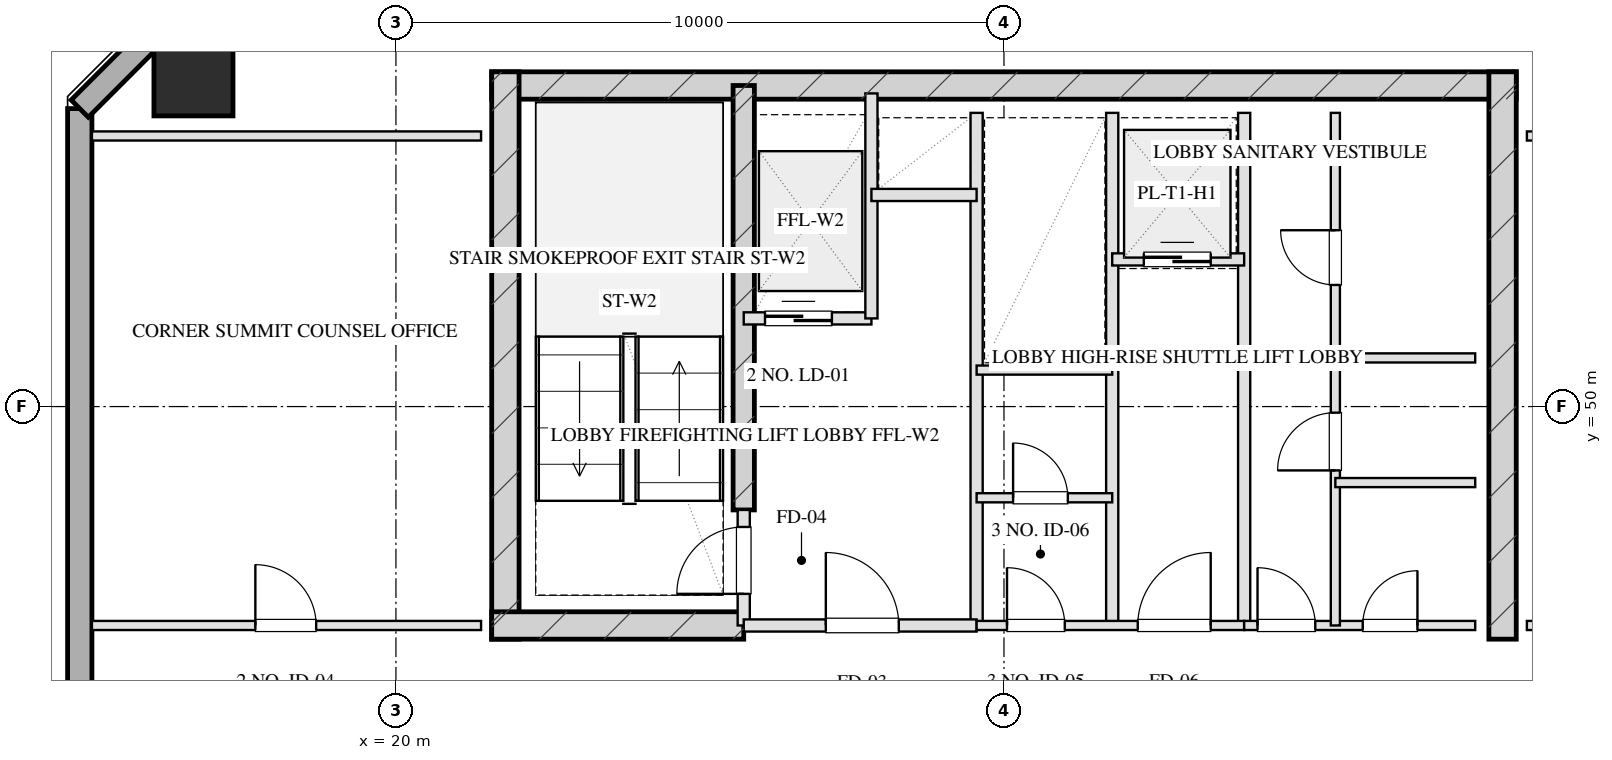
"""IFC4 building model, lengths in metres.
Left out: names, types, materials, properties, quantities, classifications, styles, units other than length and angle.
Written with IfcOpenShell. Run it as: python <this file> out.ifc"""

import sys

from ifc_helpers import new_model, si_unit, direction, frame, frame_2d, origin, origin_2d, place, context, subcontext, project, spatial, rectangle, hollow_rectangle, extrude, element, fill, save


model = new_model("IFC4")
c1 = context("Model", 3, precision=1e-05, world=origin(), true_north=direction((0.0, 1.0)))
c2 = subcontext(c1, "Body", "Model", "MODEL_VIEW")
j1 = project(units=[si_unit("LENGTHUNIT", "METRE"), si_unit("PLANEANGLEUNIT", "RADIAN")], contexts=[c1])
p1 = place(None, origin())
s1 = spatial("IfcSite", under=j1, at=p1, CompositionType="ELEMENT")
p2 = place(p1, origin())
s2 = spatial("IfcBuilding", under=s1, at=p2, CompositionType="ELEMENT")
p3 = place(p2, frame((0.0, 0.0, 263.2)))
s3 = spatial("IfcBuildingStorey", under=s2, at=p3, CompositionType="ELEMENT", Elevation=263.2)
p4 = place(p3, frame((21.575, 55.28, 0.0), z_axis=(0.0, 0.0, 1.0), x_axis=(1.0, 0.0, 0.0)))
e1 = element("IfcWall", 1, at=p4, inside=s3, PredefinedType="SHEAR", context=c2, shape_type="SweptSolid", body=[
    extrude(rectangle(XDim=16.85, YDim=0.45, at=frame_2d((8.425, 0.0))), origin(), (0.0, 0.0, 1.0), 3.2),
])
for number, where, z_axis, x_axis in (
    (2, (21.8, 46.175, 0.0), (0.0, 0.0, 1.0), (0.0, 1.0, 0.0)),
    (3, (38.2, 46.175, 0.0), (0.0, 0.0, 1.0), (0.0, 1.0, 0.0)),
):
    element("IfcWall", number, at=place(p3, frame(where, z_axis=z_axis, x_axis=x_axis)), inside=s3, PredefinedType="SHEAR", context=c2, shape_type="SweptSolid", body=[
        extrude(rectangle(XDim=9.33, YDim=0.45, at=frame_2d((4.665, 0.0))), origin(), (0.0, 0.0, 1.0), 3.2),
    ])
p5 = place(p3, frame((25.72, 48.3, 0.0), z_axis=(0.0, 0.0, 1.0), x_axis=(0.0, 1.0, 0.0)))
e4 = element("IfcWall", 4, at=p5, inside=s3, PredefinedType="SHEAR", context=c2, shape_type="SweptSolid", body=[
    extrude(rectangle(XDim=6.98, YDim=0.35, at=frame_2d((3.49, 0.0))), origin(), (0.0, 0.0, 1.0), 3.2),
])
p6 = place(p3, frame((21.575, 46.4, 0.0), z_axis=(0.0, 0.0, 1.0), x_axis=(1.0, 0.0, 0.0)))
e5 = element("IfcWall", 5, at=p6, inside=s3, PredefinedType="SHEAR", context=c2, shape_type="SweptSolid", body=[
    extrude(rectangle(XDim=4.145, YDim=0.45, at=frame_2d((2.073, 0.0))), origin(), (0.0, 0.0, 1.0), 3.2),
])
p7 = place(p3, frame((16.67, 55.43, 0.0), z_axis=(0.0, 0.0, 1.0), x_axis=(1.0, 0.0, 0.0)))
e6 = element("IfcColumn", 6, at=p7, inside=s3, PredefinedType="COLUMN", context=c2, shape_type="SweptSolid", body=[
    extrude(hollow_rectangle(XDim=1.3, YDim=1.3, WallThickness=0.045, at=origin_2d()), origin(), (0.0, 0.0, 1.0), 3.201),
])
p8 = place(p3, frame((14.8, 13.1, 0.0), z_axis=(0.0, 0.0, 1.0), x_axis=(0.0, 1.0, 0.0)))
e7 = element("IfcWall", 7, at=p8, inside=s3, PredefinedType="SOLIDWALL", context=c2, shape_type="SweptSolid", body=[
    extrude(rectangle(XDim=41.8, YDim=0.4, at=frame_2d((20.9, 0.0))), origin(), (0.0, 0.0, 1.0), 2.36),
])
p9 = place(p8, frame((13.525, 0.0, 0.75)))
e8 = element("IfcOpeningElement", 8, at=p9, cuts=e7, PredefinedType="OPENING", context=c2, shape_type="SweptSolid", body=[
    extrude(rectangle(XDim=1.95, YDim=1.21, at=frame_2d((0.975, 0.605))), frame((0.0, 0.21, 0.0), z_axis=(0.0, -1.0, 0.0), x_axis=(1.0, 0.0, 0.0)), (0.0, 0.0, 1.0), 0.42),
])
p10 = place(p8, frame((17.325, 0.0, 0.75)))
e9 = element("IfcOpeningElement", 9, at=p10, cuts=e7, PredefinedType="OPENING", context=c2, shape_type="SweptSolid", body=[
    extrude(rectangle(XDim=1.95, YDim=1.21, at=frame_2d((0.975, 0.605))), frame((0.0, 0.21, 0.0), z_axis=(0.0, -1.0, 0.0), x_axis=(1.0, 0.0, 0.0)), (0.0, 0.0, 1.0), 0.42),
])
p11 = place(p8, frame((22.525, 0.0, 0.75)))
e10 = element("IfcOpeningElement", 10, at=p11, cuts=e7, PredefinedType="OPENING", context=c2, shape_type="SweptSolid", body=[
    extrude(rectangle(XDim=1.95, YDim=1.21, at=frame_2d((0.975, 0.605))), frame((0.0, 0.21, 0.0), z_axis=(0.0, -1.0, 0.0), x_axis=(1.0, 0.0, 0.0)), (0.0, 0.0, 1.0), 0.42),
])
p12 = place(p8, frame((26.325, 0.0, 0.75)))
e11 = element("IfcOpeningElement", 11, at=p12, cuts=e7, PredefinedType="OPENING", context=c2, shape_type="SweptSolid", body=[
    extrude(rectangle(XDim=1.95, YDim=1.21, at=frame_2d((0.975, 0.605))), frame((0.0, 0.21, 0.0), z_axis=(0.0, -1.0, 0.0), x_axis=(1.0, 0.0, 0.0)), (0.0, 0.0, 1.0), 0.42),
])
p13 = place(p3, frame((14.8, 54.9, 0.0), z_axis=(0.0, 0.0, 1.0), x_axis=(0.707070815327, 0.707142745217, 0.0)))
e12 = element("IfcWall", 12, at=p13, inside=s3, PredefinedType="SOLIDWALL", context=c2, shape_type="SweptSolid", body=[
    extrude(rectangle(XDim=3.394, YDim=0.4, at=frame_2d((1.697, 0.0))), origin(), (0.0, 0.0, 1.0), 2.36),
])
p14 = place(p3, frame((25.72, 46.4, 0.0), z_axis=(0.0, 0.0, 1.0), x_axis=(0.0, 1.0, 0.0)))
e13 = element("IfcWall", 13, at=p14, inside=s3, PredefinedType="PARTITIONING", context=c2, shape_type="SweptSolid", body=[
    extrude(rectangle(XDim=1.9, YDim=0.2, at=frame_2d((0.95, 0.0))), origin(), (0.0, 0.0, 1.0), 2.925),
])
p15 = place(p14, frame((0.52, 0.0, 0.0)))
e14 = element("IfcOpeningElement", 14, at=p15, cuts=e13, PredefinedType="OPENING", context=c2, shape_type="SweptSolid", body=[
    extrude(rectangle(XDim=1.1, YDim=2.05, at=frame_2d((0.55, 1.025))), frame((0.0, 0.11, 0.0), z_axis=(0.0, -1.0, 0.0), x_axis=(1.0, 0.0, 0.0)), (0.0, 0.0, 1.0), 0.22),
])
p16 = place(p3, frame((29.55, 46.4, 0.0), z_axis=(0.0, 0.0, 1.0), x_axis=(0.0, 1.0, 0.0)))
e15 = element("IfcWall", 15, at=p16, inside=s3, PredefinedType="PARTITIONING", context=c2, shape_type="SweptSolid", body=[
    extrude(rectangle(XDim=8.43, YDim=0.2, at=frame_2d((4.215, 0.0))), origin(), (0.0, 0.0, 1.0), 2.925),
])
p17 = place(p3, frame((25.72, 46.4, 0.0), z_axis=(0.0, 0.0, 1.0), x_axis=(1.0, 0.0, 0.0)))
e16 = element("IfcWall", 16, at=p17, inside=s3, PredefinedType="PARTITIONING", context=c2, shape_type="SweptSolid", body=[
    extrude(rectangle(XDim=3.83, YDim=0.2, at=frame_2d((1.915, 0.0))), origin(), (0.0, 0.0, 1.0), 2.925),
])
p18 = place(p17, frame((1.35, 0.0, 0.0)))
e17 = element("IfcOpeningElement", 17, at=p18, cuts=e16, PredefinedType="OPENING", context=c2, shape_type="SweptSolid", body=[
    extrude(rectangle(XDim=1.2, YDim=2.05, at=frame_2d((0.6, 1.025))), frame((0.0, 0.11, 0.0), z_axis=(0.0, -1.0, 0.0), x_axis=(1.0, 0.0, 0.0)), (0.0, 0.0, 1.0), 0.22),
])
p19 = place(p3, frame((25.72, 51.45, 0.0), z_axis=(0.0, 0.0, 1.0), x_axis=(1.0, 0.0, 0.0)))
e18 = element("IfcWall", 18, at=p19, inside=s3, PredefinedType="PARTITIONING", context=c2, shape_type="SweptSolid", body=[
    extrude(rectangle(XDim=2.1, YDim=0.2, at=frame_2d((1.05, 0.0))), origin(), (0.0, 0.0, 1.0), 2.925),
])
p20 = place(p19, frame((0.35, 0.0, 0.0)))
e19 = element("IfcOpeningElement", 19, at=p20, cuts=e18, PredefinedType="OPENING", context=c2, shape_type="SweptSolid", body=[
    extrude(rectangle(XDim=1.1, YDim=2.05, at=frame_2d((0.55, 1.025))), frame((0.0, 0.11, 0.0), z_axis=(0.0, -1.0, 0.0), x_axis=(1.0, 0.0, 0.0)), (0.0, 0.0, 1.0), 0.22),
])
p21 = place(p3, frame((27.82, 51.45, 0.0), z_axis=(0.0, 0.0, 1.0), x_axis=(0.0, 1.0, 0.0)))
e20 = element("IfcWall", 20, at=p21, inside=s3, PredefinedType="PARTITIONING", context=c2, shape_type="SweptSolid", body=[
    extrude(rectangle(XDim=3.7, YDim=0.2, at=frame_2d((1.85, 0.0))), origin(), (0.0, 0.0, 1.0), 2.925),
])
p22 = place(p3, frame((27.82, 53.48, 0.0), z_axis=(0.0, 0.0, 1.0), x_axis=(1.0, 0.0, 0.0)))
e21 = element("IfcWall", 21, at=p22, inside=s3, PredefinedType="PARTITIONING", context=c2, shape_type="SweptSolid", body=[
    extrude(rectangle(XDim=1.73, YDim=0.2, at=frame_2d((0.865, 0.0))), origin(), (0.0, 0.0, 1.0), 2.925),
])
for number, where, z_axis, x_axis in (
    (22, (33.95, 46.4, 0.0), (0.0, 0.0, 1.0), (0.0, 1.0, 0.0)),
    (23, (31.78, 46.4, 0.0), (0.0, 0.0, 1.0), (0.0, 1.0, 0.0)),
):
    element("IfcWall", number, at=place(p3, frame(where, z_axis=z_axis, x_axis=x_axis)), inside=s3, PredefinedType="PARTITIONING", context=c2, shape_type="SweptSolid", body=[
        extrude(rectangle(XDim=8.43, YDim=0.2, at=frame_2d((4.215, 0.0))), origin(), (0.0, 0.0, 1.0), 2.925),
    ])
p23 = place(p3, frame((29.55, 46.4, 0.0), z_axis=(0.0, 0.0, 1.0), x_axis=(1.0, 0.0, 0.0)))
e24 = element("IfcWall", 24, at=p23, inside=s3, PredefinedType="PARTITIONING", context=c2, shape_type="SweptSolid", body=[
    extrude(rectangle(XDim=4.4, YDim=0.15, at=frame_2d((2.2, 0.0))), origin(), (0.0, 0.0, 1.0), 2.925),
])
p24 = place(p23, frame((0.5, 0.0, 0.0)))
e25 = element("IfcOpeningElement", 25, at=p24, cuts=e24, PredefinedType="OPENING", context=c2, shape_type="SweptSolid", body=[
    extrude(rectangle(XDim=0.95, YDim=2.05, at=frame_2d((0.475, 1.025))), frame((0.0, 0.085, 0.0), z_axis=(0.0, -1.0, 0.0), x_axis=(1.0, 0.0, 0.0)), (0.0, 0.0, 1.0), 0.17),
])
p25 = place(p23, frame((2.65, 0.0, 0.0)))
e26 = element("IfcOpeningElement", 26, at=p25, cuts=e24, PredefinedType="OPENING", context=c2, shape_type="SweptSolid", body=[
    extrude(rectangle(XDim=1.2, YDim=2.05, at=frame_2d((0.6, 1.025))), frame((0.0, 0.085, 0.0), z_axis=(0.0, -1.0, 0.0), x_axis=(1.0, 0.0, 0.0)), (0.0, 0.0, 1.0), 0.17),
])
p26 = place(p3, frame((29.55, 50.6, 0.0), z_axis=(0.0, 0.0, 1.0), x_axis=(1.0, 0.0, 0.0)))
e27 = element("IfcWall", 27, at=p26, inside=s3, PredefinedType="PARTITIONING", context=c2, shape_type="SweptSolid", body=[
    extrude(rectangle(XDim=2.23, YDim=0.15, at=frame_2d((1.115, 0.0))), origin(), (0.0, 0.0, 1.0), 2.925),
])
p27 = place(p3, frame((29.55, 48.5, 0.0), z_axis=(0.0, 0.0, 1.0), x_axis=(1.0, 0.0, 0.0)))
e28 = element("IfcWall", 28, at=p27, inside=s3, PredefinedType="PARTITIONING", context=c2, shape_type="SweptSolid", body=[
    extrude(rectangle(XDim=2.23, YDim=0.15, at=frame_2d((1.115, 0.0))), origin(), (0.0, 0.0, 1.0), 2.925),
])
p28 = place(p27, frame((0.6, 0.0, 0.0)))
e29 = element("IfcOpeningElement", 29, at=p28, cuts=e28, PredefinedType="OPENING", context=c2, shape_type="SweptSolid", body=[
    extrude(rectangle(XDim=0.9, YDim=2.05, at=frame_2d((0.45, 1.025))), frame((0.0, 0.085, 0.0), z_axis=(0.0, -1.0, 0.0), x_axis=(1.0, 0.0, 0.0)), (0.0, 0.0, 1.0), 0.17),
])
p29 = place(p3, frame((31.78, 52.42, 0.0), z_axis=(0.0, 0.0, 1.0), x_axis=(1.0, 0.0, 0.0)))
e30 = element("IfcWall", 30, at=p29, inside=s3, PredefinedType="PARTITIONING", context=c2, shape_type="SweptSolid", body=[
    extrude(rectangle(XDim=2.17, YDim=0.2, at=frame_2d((1.085, 0.0))), origin(), (0.0, 0.0, 1.0), 2.925),
])
p30 = place(p29, frame((0.52, 0.0, 0.0)))
e31 = element("IfcOpeningElement", 31, at=p30, cuts=e30, PredefinedType="OPENING", context=c2, shape_type="SweptSolid", body=[
    extrude(rectangle(XDim=1.1, YDim=2.05, at=frame_2d((0.55, 1.025))), frame((0.0, 0.11, 0.0), z_axis=(0.0, -1.0, 0.0), x_axis=(1.0, 0.0, 0.0)), (0.0, 0.0, 1.0), 0.22),
])
p31 = place(p3, frame((33.95, 46.4, 0.0), z_axis=(0.0, 0.0, 1.0), x_axis=(1.0, 0.0, 0.0)))
e32 = element("IfcWall", 32, at=p31, inside=s3, PredefinedType="PARTITIONING", context=c2, shape_type="SweptSolid", body=[
    extrude(rectangle(XDim=3.8, YDim=0.15, at=frame_2d((1.9, 0.0))), origin(), (0.0, 0.0, 1.0), 2.925),
])
p32 = place(p31, frame((0.22, 0.0, 0.0)))
e33 = element("IfcOpeningElement", 33, at=p32, cuts=e32, PredefinedType="OPENING", context=c2, shape_type="SweptSolid", body=[
    extrude(rectangle(XDim=0.95, YDim=2.05, at=frame_2d((0.475, 1.025))), frame((0.0, 0.085, 0.0), z_axis=(0.0, -1.0, 0.0), x_axis=(1.0, 0.0, 0.0)), (0.0, 0.0, 1.0), 0.17),
])
p33 = place(p31, frame((1.95, 0.0, 0.0)))
e34 = element("IfcOpeningElement", 34, at=p33, cuts=e32, PredefinedType="OPENING", context=c2, shape_type="SweptSolid", body=[
    extrude(rectangle(XDim=0.9, YDim=2.05, at=frame_2d((0.45, 1.025))), frame((0.0, 0.085, 0.0), z_axis=(0.0, -1.0, 0.0), x_axis=(1.0, 0.0, 0.0)), (0.0, 0.0, 1.0), 0.17),
])
p34 = place(p3, frame((35.45, 46.4, 0.0), z_axis=(0.0, 0.0, 1.0), x_axis=(0.0, 1.0, 0.0)))
e35 = element("IfcWall", 35, at=p34, inside=s3, PredefinedType="PARTITIONING", context=c2, shape_type="SweptSolid", body=[
    extrude(rectangle(XDim=8.43, YDim=0.15, at=frame_2d((4.215, 0.0))), origin(), (0.0, 0.0, 1.0), 2.515),
])
p35 = place(p34, frame((2.55, 0.0, 0.0)))
e36 = element("IfcOpeningElement", 36, at=p35, cuts=e35, PredefinedType="OPENING", context=c2, shape_type="SweptSolid", body=[
    extrude(rectangle(XDim=0.95, YDim=2.05, at=frame_2d((0.475, 1.025))), frame((0.0, 0.085, 0.0), z_axis=(0.0, -1.0, 0.0), x_axis=(1.0, 0.0, 0.0)), (0.0, 0.0, 1.0), 0.17),
])
p36 = place(p34, frame((5.6, 0.0, 0.0)))
e37 = element("IfcOpeningElement", 37, at=p36, cuts=e35, PredefinedType="OPENING", context=c2, shape_type="SweptSolid", body=[
    extrude(rectangle(XDim=0.9, YDim=2.05, at=frame_2d((0.45, 1.025))), frame((0.0, 0.085, 0.0), z_axis=(0.0, -1.0, 0.0), x_axis=(1.0, 0.0, 0.0)), (0.0, 0.0, 1.0), 0.17),
])
for number, where, z_axis, x_axis in (
    (38, (35.45, 50.8, 0.0), (0.0, 0.0, 1.0), (1.0, 0.0, 0.0)),
    (39, (35.45, 48.75, 0.0), (0.0, 0.0, 1.0), (1.0, 0.0, 0.0)),
):
    element("IfcWall", number, at=place(p3, frame(where, z_axis=z_axis, x_axis=x_axis)), inside=s3, PredefinedType="PARTITIONING", context=c2, shape_type="SweptSolid", body=[
        extrude(rectangle(XDim=2.3, YDim=0.15, at=frame_2d((1.15, 0.0))), origin(), (0.0, 0.0, 1.0), 2.925),
    ])
p37 = place(p3, frame((15.0, 54.45, 0.0), z_axis=(0.0, 0.0, 1.0), x_axis=(1.0, 0.0, 0.0)))
e40 = element("IfcWall", 40, at=p37, inside=s3, PredefinedType="PARTITIONING", context=c2, shape_type="SweptSolid", body=[
    extrude(rectangle(XDim=6.4, YDim=0.15, at=frame_2d((3.2, 0.0))), origin(), (0.0, 0.0, 1.0), 2.925),
])
p38 = place(p3, frame((15.0, 46.4, 0.0), z_axis=(0.0, 0.0, 1.0), x_axis=(1.0, 0.0, 0.0)))
e41 = element("IfcWall", 41, at=p38, inside=s3, PredefinedType="PARTITIONING", context=c2, shape_type="SweptSolid", body=[
    extrude(rectangle(XDim=6.4, YDim=0.15, at=frame_2d((3.2, 0.0))), origin(), (0.0, 0.0, 1.0), 2.925),
])
p39 = place(p38, frame((2.688, 0.0, 0.0)))
e42 = element("IfcOpeningElement", 42, at=p39, cuts=e41, PredefinedType="OPENING", context=c2, shape_type="SweptSolid", body=[
    extrude(rectangle(XDim=1.0, YDim=2.05, at=frame_2d((0.5, 1.025))), frame((0.0, 0.085, 0.0), z_axis=(0.0, -1.0, 0.0), x_axis=(1.0, 0.0, 0.0)), (0.0, 0.0, 1.0), 0.17),
])
p40 = place(p3, frame((38.6, 54.45, 0.0), z_axis=(0.0, 0.0, 1.0), x_axis=(1.0, 0.0, 0.0)))
e43 = element("IfcWall", 43, at=p40, inside=s3, PredefinedType="PARTITIONING", context=c2, shape_type="SweptSolid", body=[
    extrude(rectangle(XDim=6.4, YDim=0.15, at=frame_2d((3.2, 0.0))), origin(), (0.0, 0.0, 1.0), 2.925),
])
p41 = place(p3, frame((38.6, 46.4, 0.0), z_axis=(0.0, 0.0, 1.0), x_axis=(1.0, 0.0, 0.0)))
e44 = element("IfcWall", 44, at=p41, inside=s3, PredefinedType="PARTITIONING", context=c2, shape_type="SweptSolid", body=[
    extrude(rectangle(XDim=6.4, YDim=0.15, at=frame_2d((3.2, 0.0))), origin(), (0.0, 0.0, 1.0), 2.925),
])
p42 = place(p41, frame((2.688, 0.0, 0.0)))
e45 = element("IfcOpeningElement", 45, at=p42, cuts=e44, PredefinedType="OPENING", context=c2, shape_type="SweptSolid", body=[
    extrude(rectangle(XDim=1.0, YDim=2.05, at=frame_2d((0.5, 1.025))), frame((0.0, 0.085, 0.0), z_axis=(0.0, -1.0, 0.0), x_axis=(1.0, 0.0, 0.0)), (0.0, 0.0, 1.0), 0.17),
])
p43 = place(p15, origin())
e46 = element("IfcDoor", 46, at=p43, inside=s3, OperationType="SINGLE_SWING_LEFT", PredefinedType="DOOR", context=c2, shape_type="SweptSolid", body=[
    extrude(rectangle(XDim=1.1, YDim=2.05, at=frame_2d((0.55, 1.025))), frame((0.0, 0.025, 0.0), z_axis=(0.0, -1.0, 0.0), x_axis=(1.0, 0.0, 0.0)), (0.0, 0.0, 1.0), 0.05),
])
fill(e14, e46)
p44 = place(p18, origin())
e47 = element("IfcDoor", 47, at=p44, inside=s3, OperationType="SINGLE_SWING_LEFT", PredefinedType="DOOR", context=c2, shape_type="SweptSolid", body=[
    extrude(rectangle(XDim=1.2, YDim=2.05, at=frame_2d((0.6, 1.025))), frame((0.0, 0.025, 0.0), z_axis=(0.0, -1.0, 0.0), x_axis=(1.0, 0.0, 0.0)), (0.0, 0.0, 1.0), 0.05),
])
fill(e17, e47)
p45 = place(p20, origin())
e48 = element("IfcDoor", 48, at=p45, inside=s3, OperationType="DOUBLE_DOOR_SLIDING", PredefinedType="DOOR", context=c2, shape_type="SweptSolid", body=[
    extrude(rectangle(XDim=1.1, YDim=2.05, at=frame_2d((0.55, 1.025))), frame((0.0, 0.025, 0.0), z_axis=(0.0, -1.0, 0.0), x_axis=(1.0, 0.0, 0.0)), (0.0, 0.0, 1.0), 0.05),
])
fill(e19, e48)
p46 = place(p24, origin())
e49 = element("IfcDoor", 49, at=p46, inside=s3, OperationType="SINGLE_SWING_LEFT", PredefinedType="DOOR", context=c2, shape_type="SweptSolid", body=[
    extrude(rectangle(XDim=0.95, YDim=2.05, at=frame_2d((0.475, 1.025))), frame((0.0, 0.025, 0.0), z_axis=(0.0, -1.0, 0.0), x_axis=(1.0, 0.0, 0.0)), (0.0, 0.0, 1.0), 0.05),
])
fill(e25, e49)
p47 = place(p25, origin())
e50 = element("IfcDoor", 50, at=p47, inside=s3, OperationType="SINGLE_SWING_RIGHT", PredefinedType="DOOR", context=c2, shape_type="SweptSolid", body=[
    extrude(rectangle(XDim=1.2, YDim=2.05, at=frame_2d((0.6, 1.025))), frame((0.0, 0.025, 0.0), z_axis=(0.0, -1.0, 0.0), x_axis=(1.0, 0.0, 0.0)), (0.0, 0.0, 1.0), 0.05),
])
fill(e26, e50)
p48 = place(p28, origin())
e51 = element("IfcDoor", 51, at=p48, inside=s3, OperationType="SINGLE_SWING_LEFT", PredefinedType="DOOR", context=c2, shape_type="SweptSolid", body=[
    extrude(rectangle(XDim=0.9, YDim=2.05, at=frame_2d((0.45, 1.025))), frame((0.0, 0.025, 0.0), z_axis=(0.0, -1.0, 0.0), x_axis=(1.0, 0.0, 0.0)), (0.0, 0.0, 1.0), 0.05),
])
fill(e29, e51)
p49 = place(p30, origin())
e52 = element("IfcDoor", 52, at=p49, inside=s3, OperationType="DOUBLE_DOOR_SLIDING", PredefinedType="DOOR", context=c2, shape_type="SweptSolid", body=[
    extrude(rectangle(XDim=1.1, YDim=2.05, at=frame_2d((0.55, 1.025))), frame((0.0, 0.025, 0.0), z_axis=(0.0, -1.0, 0.0), x_axis=(1.0, 0.0, 0.0)), (0.0, 0.0, 1.0), 0.05),
])
fill(e31, e52)
p50 = place(p32, origin())
e53 = element("IfcDoor", 53, at=p50, inside=s3, OperationType="SINGLE_SWING_LEFT", PredefinedType="DOOR", context=c2, shape_type="SweptSolid", body=[
    extrude(rectangle(XDim=0.95, YDim=2.05, at=frame_2d((0.475, 1.025))), frame((0.0, 0.025, 0.0), z_axis=(0.0, -1.0, 0.0), x_axis=(1.0, 0.0, 0.0)), (0.0, 0.0, 1.0), 0.05),
])
fill(e33, e53)
p51 = place(p33, origin())
e54 = element("IfcDoor", 54, at=p51, inside=s3, OperationType="SINGLE_SWING_RIGHT", PredefinedType="DOOR", context=c2, shape_type="SweptSolid", body=[
    extrude(rectangle(XDim=0.9, YDim=2.05, at=frame_2d((0.45, 1.025))), frame((0.0, 0.025, 0.0), z_axis=(0.0, -1.0, 0.0), x_axis=(1.0, 0.0, 0.0)), (0.0, 0.0, 1.0), 0.05),
])
fill(e34, e54)
p52 = place(p35, origin())
e55 = element("IfcDoor", 55, at=p52, inside=s3, OperationType="SINGLE_SWING_LEFT", PredefinedType="DOOR", context=c2, shape_type="SweptSolid", body=[
    extrude(rectangle(XDim=0.95, YDim=2.05, at=frame_2d((0.475, 1.025))), frame((0.0, 0.025, 0.0), z_axis=(0.0, -1.0, 0.0), x_axis=(1.0, 0.0, 0.0)), (0.0, 0.0, 1.0), 0.05),
])
fill(e36, e55)
p53 = place(p36, origin())
e56 = element("IfcDoor", 56, at=p53, inside=s3, OperationType="SINGLE_SWING_RIGHT", PredefinedType="DOOR", context=c2, shape_type="SweptSolid", body=[
    extrude(rectangle(XDim=0.9, YDim=2.05, at=frame_2d((0.45, 1.025))), frame((0.0, 0.025, 0.0), z_axis=(0.0, -1.0, 0.0), x_axis=(1.0, 0.0, 0.0)), (0.0, 0.0, 1.0), 0.05),
])
fill(e37, e56)
p54 = place(p39, origin())
e57 = element("IfcDoor", 57, at=p54, inside=s3, OperationType="SINGLE_SWING_LEFT", PredefinedType="DOOR", context=c2, shape_type="SweptSolid", body=[
    extrude(rectangle(XDim=1.0, YDim=2.05, at=frame_2d((0.5, 1.025))), frame((0.0, 0.025, 0.0), z_axis=(0.0, -1.0, 0.0), x_axis=(1.0, 0.0, 0.0)), (0.0, 0.0, 1.0), 0.05),
])
fill(e42, e57)
save(model, sys.argv[1])
